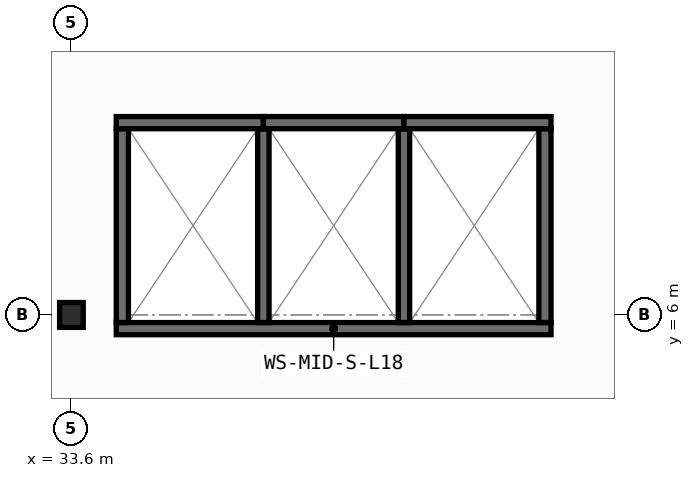
"""IFC4 building model, lengths in metres.
Left out: names, types, materials, properties, quantities, classifications, styles, units other than length and angle.
Written with IfcOpenShell. Run it as: python <this file> out.ifc"""

import sys

from ifc_helpers import new_model, si_unit, direction, frame, frame_2d, origin, origin_2d, place, context, subcontext, project, spatial, rectangle, i_section, extrude, element, save


model = new_model("IFC4")
c1 = context("Model", 3, precision=1e-05, world=origin(), true_north=direction((0.0, 1.0)))
c2 = subcontext(c1, "Body", "Model", "MODEL_VIEW")
j1 = project(units=[si_unit("LENGTHUNIT", "METRE"), si_unit("PLANEANGLEUNIT", "RADIAN")], contexts=[c1])
p1 = place(None, origin())
s1 = spatial("IfcSite", under=j1, at=p1, CompositionType="ELEMENT")
p2 = place(p1, origin())
s2 = spatial("IfcBuilding", under=s1, at=p2, CompositionType="ELEMENT")
p3 = place(p2, frame((0.0, 0.0, 73.85)))
s3 = spatial("IfcBuildingStorey", under=s2, at=p3, CompositionType="ELEMENT", Elevation=73.85)
p4 = place(p3, frame((33.6, 6.0, 0.0), z_axis=(0.0, 0.0, 1.0), x_axis=(1.0, 0.0, 0.0)))
e1 = element("IfcColumn", 1, at=p4, inside=s3, PredefinedType="COLUMN", context=c2, shape_type="SweptSolid", body=[
    extrude(i_section(OverallWidth=0.311, OverallDepth=0.327, WebThickness=0.016, FlangeThickness=0.025, FilletRadius=0.017, at=origin_2d()), origin(), (0.0, 0.0, 1.0), 3.95),
])
p5 = place(p3, frame((34.19, 5.82, 0.0), z_axis=(0.0, 0.0, 1.0), x_axis=(1.0, 0.0, 0.0)))
e2 = element("IfcWall", 2, at=p5, inside=s3, PredefinedType="SHEAR", context=c2, shape_type="SweptSolid", body=[
    extrude(rectangle(XDim=5.72, YDim=0.16, at=frame_2d((2.86, 0.0))), origin(), (0.0, 0.0, 1.0), 3.71),
])
for number, where, z_axis, x_axis in (
    (3, (34.27, 5.9, 0.0), (0.0, 0.0, 1.0), (0.0, 1.0, 0.0)),
    (4, (39.83, 5.9, 0.0), (0.0, 0.0, 1.0), (0.0, 1.0, 0.0)),
):
    element("IfcWall", number, at=place(p3, frame(where, z_axis=z_axis, x_axis=x_axis)), inside=s3, PredefinedType="SHEAR", context=c2, shape_type="SweptSolid", body=[
        extrude(rectangle(XDim=2.55, YDim=0.16, at=frame_2d((1.275, 0.0))), origin(), (0.0, 0.0, 1.0), 3.71),
    ])
for number, where, z_axis, x_axis in (
    (5, (36.125, 5.9, 0.0), (0.0, 0.0, 1.0), (0.0, 1.0, 0.0)),
    (6, (37.975, 5.9, 0.0), (0.0, 0.0, 1.0), (0.0, 1.0, 0.0)),
):
    element("IfcWall", number, at=place(p3, frame(where, z_axis=z_axis, x_axis=x_axis)), inside=s3, PredefinedType="SHEAR", context=c2, shape_type="SweptSolid", body=[
        extrude(rectangle(XDim=2.55, YDim=0.15, at=frame_2d((1.275, 0.0))), origin(), (0.0, 0.0, 1.0), 3.71),
    ])
p6 = place(p3, frame((34.19, 8.53, 0.0), z_axis=(0.0, 0.0, 1.0), x_axis=(1.0, 0.0, 0.0)))
e7 = element("IfcWall", 7, at=p6, inside=s3, PredefinedType="SHEAR", context=c2, shape_type="SweptSolid", body=[
    extrude(rectangle(XDim=1.935, YDim=0.16, at=frame_2d((0.968, 0.0))), origin(), (0.0, 0.0, 1.0), 3.71),
])
p7 = place(p3, frame((36.125, 8.53, 0.0), z_axis=(0.0, 0.0, 1.0), x_axis=(1.0, 0.0, 0.0)))
e8 = element("IfcWall", 8, at=p7, inside=s3, PredefinedType="SHEAR", context=c2, shape_type="SweptSolid", body=[
    extrude(rectangle(XDim=1.85, YDim=0.16, at=frame_2d((0.925, 0.0))), origin(), (0.0, 0.0, 1.0), 3.71),
])
p8 = place(p3, frame((37.975, 8.53, 0.0), z_axis=(0.0, 0.0, 1.0), x_axis=(1.0, 0.0, 0.0)))
e9 = element("IfcWall", 9, at=p8, inside=s3, PredefinedType="SHEAR", context=c2, shape_type="SweptSolid", body=[
    extrude(rectangle(XDim=1.935, YDim=0.16, at=frame_2d((0.967, 0.0))), origin(), (0.0, 0.0, 1.0), 3.71),
])
save(model, sys.argv[1])
